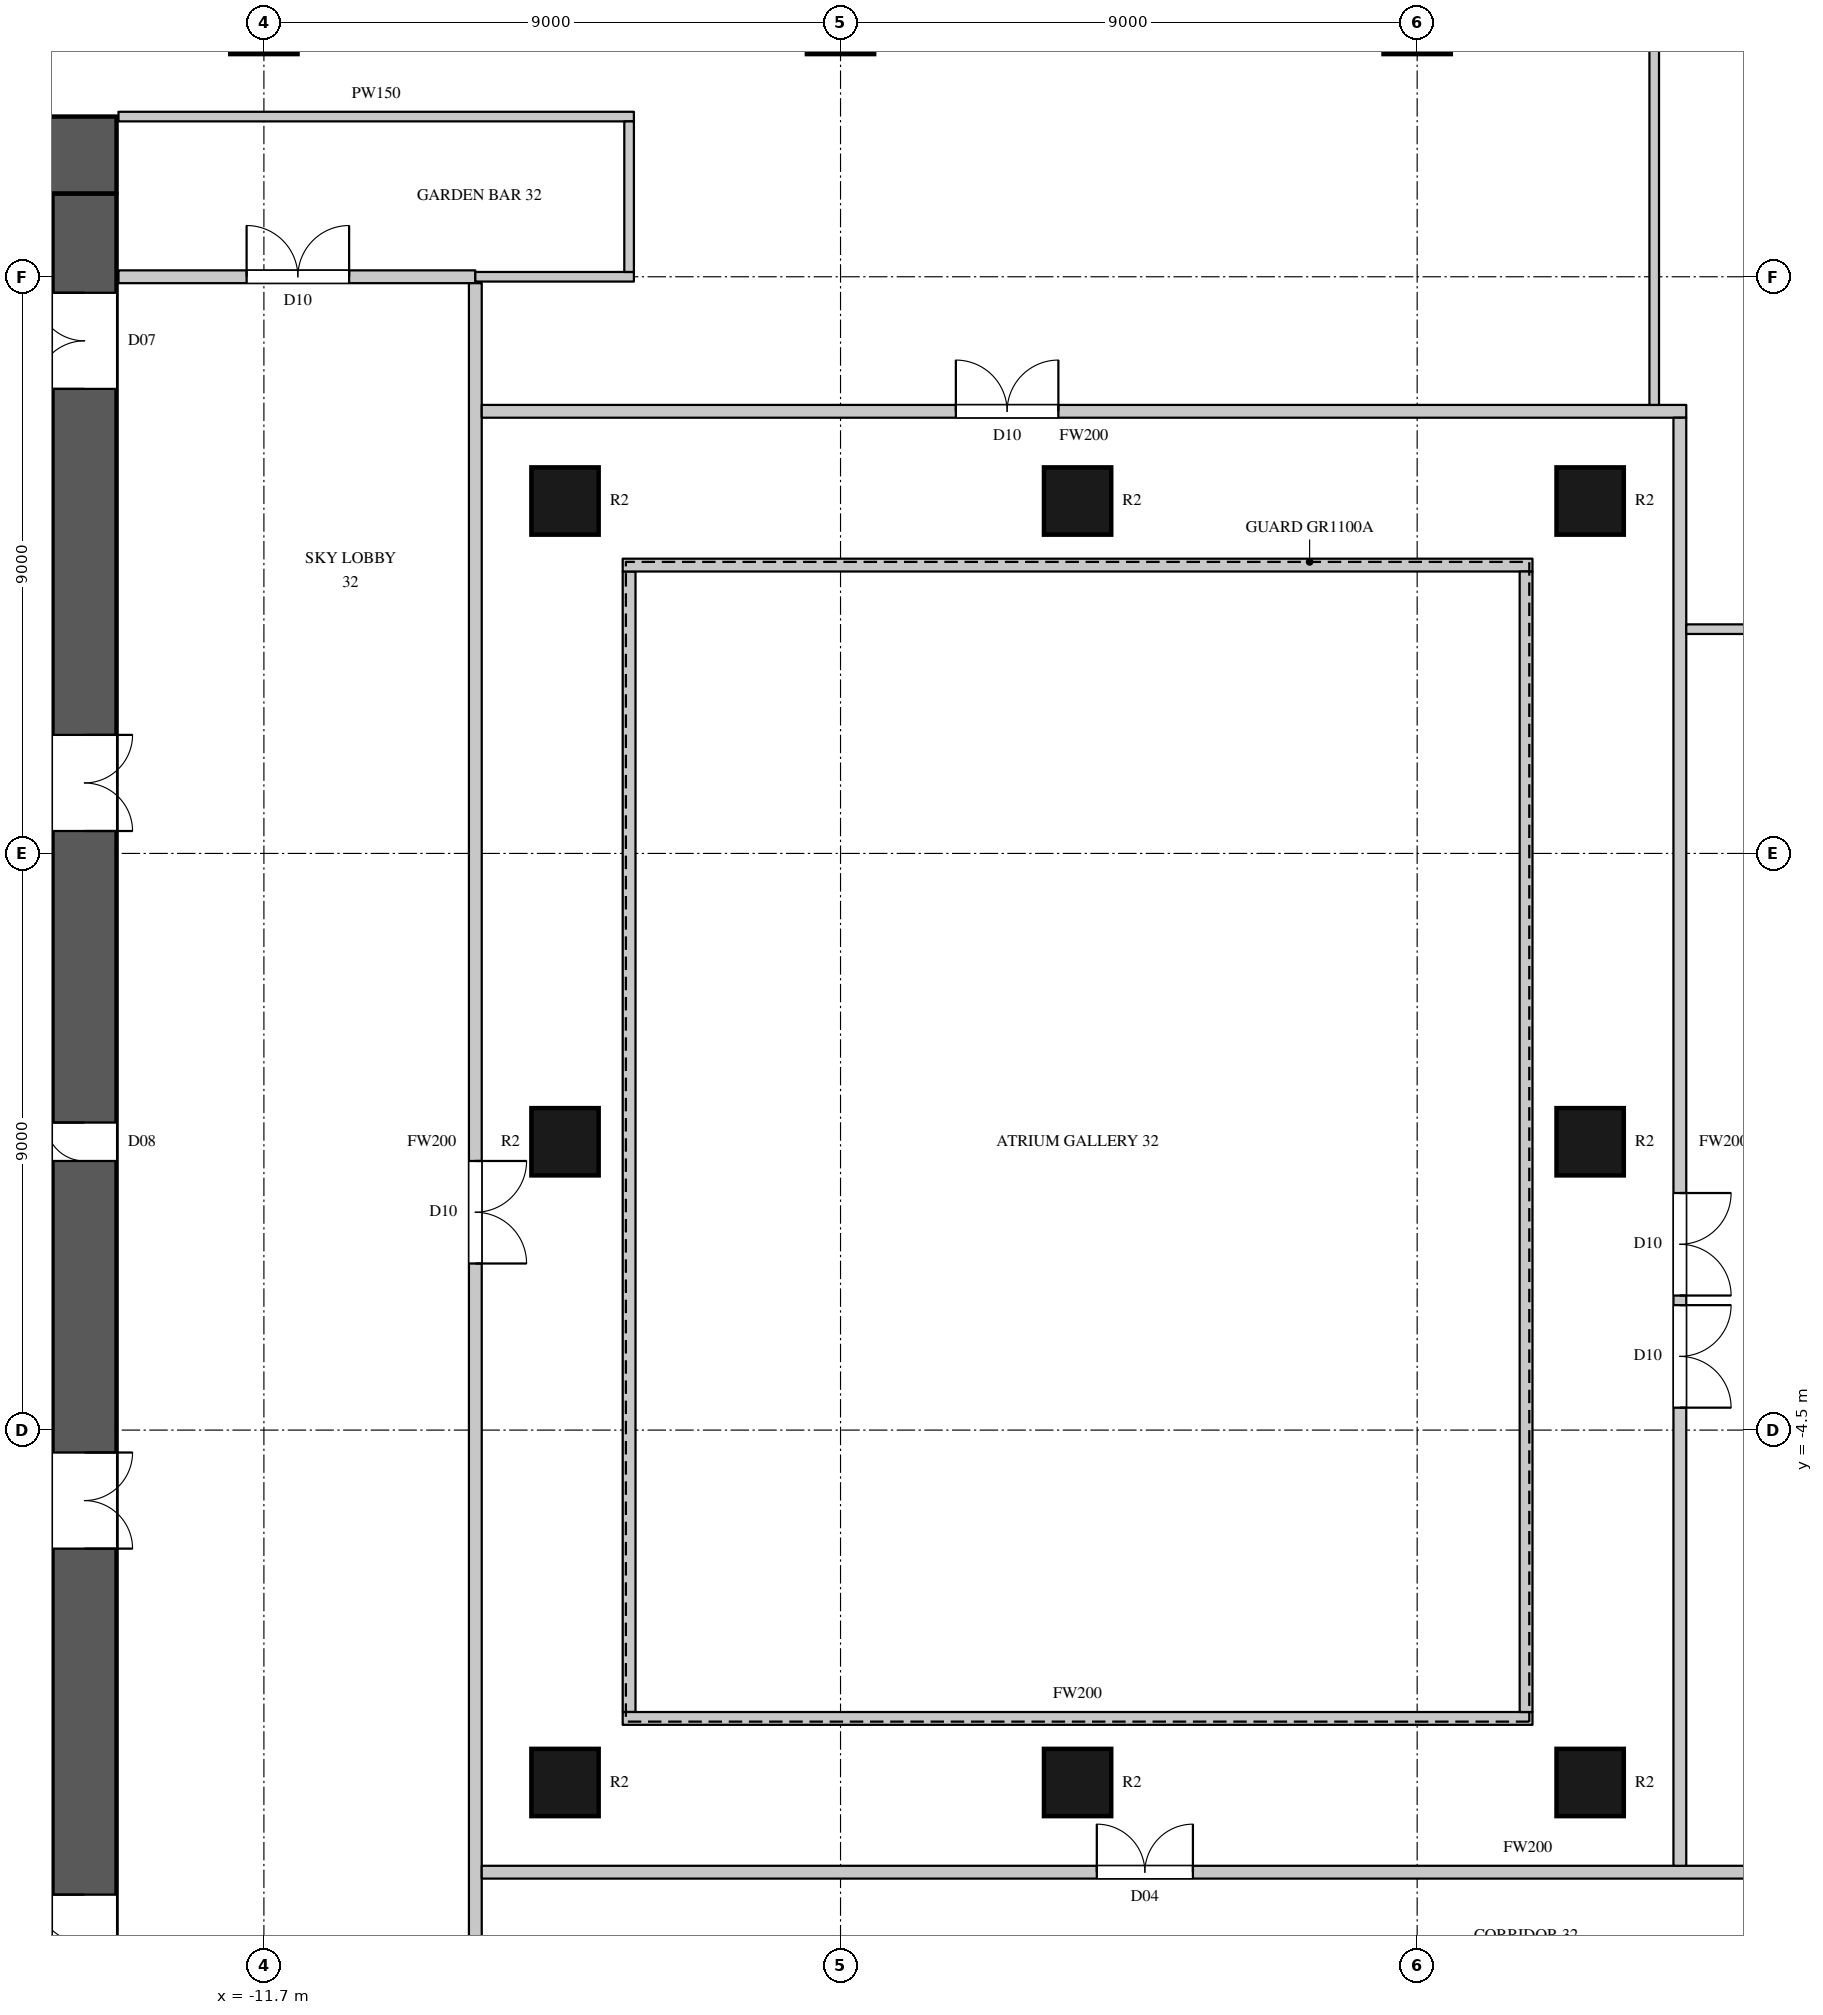
"""IFC4 building model, lengths in metres.
Left out: names, types, materials, properties, quantities, classifications, styles, units other than length and angle.
Written with IfcOpenShell. Run it as: python <this file> out.ifc"""

import sys

from ifc_helpers import new_model, si_unit, direction, frame, frame_2d, origin, origin_2d, place, context, subcontext, project, spatial, rectangle, circle, extrude, element, fill, save


model = new_model("IFC4")
c1 = context("Model", 3, precision=1e-05, world=origin(), true_north=direction((0.0, 1.0)))
c2 = subcontext(c1, "Body", "Model", "MODEL_VIEW")
j1 = project(units=[si_unit("LENGTHUNIT", "METRE"), si_unit("PLANEANGLEUNIT", "RADIAN")], contexts=[c1])
p1 = place(None, origin())
s1 = spatial("IfcSite", under=j1, at=p1, CompositionType="ELEMENT")
p2 = place(p1, origin())
s2 = spatial("IfcBuilding", under=s1, at=p2, CompositionType="ELEMENT")
p3 = place(p2, frame((0.0, 0.0, 145.5)))
s3 = spatial("IfcBuildingStorey", under=s2, at=p3, CompositionType="ELEMENT", Elevation=145.5)
for number, where, z_axis, x_axis in (
    (1, (-11.7, 17.5, 0.0), (0.0, 0.0, 1.0), (1.0, 0.0, 0.0)),
    (2, (-2.7, 17.5, 0.0), (0.0, 0.0, 1.0), (1.0, 0.0, 0.0)),
    (3, (6.3, 17.5, 0.0), (0.0, 0.0, 1.0), (1.0, 0.0, 0.0)),
    (4, (-7.0, -10.0, 0.0), (0.0, 0.0, 1.0), (1.0, 0.0, 0.0)),
    (5, (-7.0, 0.0, 0.0), (0.0, 0.0, 1.0), (1.0, 0.0, 0.0)),
    (6, (-7.0, 10.0, 0.0), (0.0, 0.0, 1.0), (1.0, 0.0, 0.0)),
    (7, (1.0, -10.0, 0.0), (0.0, 0.0, 1.0), (1.0, 0.0, 0.0)),
    (8, (1.0, 10.0, 0.0), (0.0, 0.0, 1.0), (1.0, 0.0, 0.0)),
    (9, (9.0, -10.0, 0.0), (0.0, 0.0, 1.0), (1.0, 0.0, 0.0)),
    (10, (9.0, 0.0, 0.0), (0.0, 0.0, 1.0), (1.0, 0.0, 0.0)),
    (11, (9.0, 10.0, 0.0), (0.0, 0.0, 1.0), (1.0, 0.0, 0.0)),
):
    element("IfcColumn", number, at=place(p3, frame(where, z_axis=z_axis, x_axis=x_axis)), inside=s3, PredefinedType="COLUMN", context=c2, shape_type="SweptSolid", body=[
        extrude(circle(Radius=0.525, at=origin_2d()), origin(), (0.0, 0.0, 1.0), 7.0),
    ])
p4 = place(p3, frame((-30.0, 15.4, 0.0), z_axis=(0.0, 0.0, 1.0), x_axis=(1.0, 0.0, 0.0)))
e12 = element("IfcWall", 12, at=p4, inside=s3, PredefinedType="SHEAR", context=c2, shape_type="SweptSolid", body=[
    extrude(rectangle(XDim=16.0, YDim=1.2, at=frame_2d((8.0, 0.0))), origin(), (0.0, 0.0, 1.0), 7.0),
])
p5 = place(p3, frame((-14.5, -14.8, 0.0), z_axis=(0.0, 0.0, 1.0), x_axis=(0.0, 1.0, 0.0)))
e13 = element("IfcWall", 13, at=p5, inside=s3, PredefinedType="SHEAR", context=c2, shape_type="SweptSolid", body=[
    extrude(rectangle(XDim=29.6, YDim=1.0, at=frame_2d((14.8, 0.0))), origin(), (0.0, 0.0, 1.0), 7.0),
])
p6 = place(p5, frame((1.55, 0.0, 0.0)))
e14 = element("IfcOpeningElement", 14, at=p6, cuts=e13, PredefinedType="OPENING", context=c2, shape_type="SweptSolid", body=[
    extrude(rectangle(XDim=1.5, YDim=2.4, at=frame_2d((0.75, 1.2))), frame((0.0, 0.51, 0.0), z_axis=(0.0, -1.0, 0.0), x_axis=(1.0, 0.0, 0.0)), (0.0, 0.0, 1.0), 1.02),
])
p7 = place(p5, frame((26.55, 0.0, 0.0)))
e15 = element("IfcOpeningElement", 15, at=p7, cuts=e13, PredefinedType="OPENING", context=c2, shape_type="SweptSolid", body=[
    extrude(rectangle(XDim=1.5, YDim=2.4, at=frame_2d((0.75, 1.2))), frame((0.0, 0.51, 0.0), z_axis=(0.0, -1.0, 0.0), x_axis=(1.0, 0.0, 0.0)), (0.0, 0.0, 1.0), 1.02),
])
p8 = place(p5, frame((8.45, 0.0, 0.0)))
e16 = element("IfcOpeningElement", 16, at=p8, cuts=e13, PredefinedType="OPENING", context=c2, shape_type="SweptSolid", body=[
    extrude(rectangle(XDim=1.5, YDim=2.4, at=frame_2d((0.75, 1.2))), frame((0.0, 0.51, 0.0), z_axis=(0.0, -1.0, 0.0), x_axis=(1.0, 0.0, 0.0)), (0.0, 0.0, 1.0), 1.02),
])
p9 = place(p5, frame((19.65, 0.0, 0.0)))
e17 = element("IfcOpeningElement", 17, at=p9, cuts=e13, PredefinedType="OPENING", context=c2, shape_type="SweptSolid", body=[
    extrude(rectangle(XDim=1.5, YDim=2.4, at=frame_2d((0.75, 1.2))), frame((0.0, 0.51, 0.0), z_axis=(0.0, -1.0, 0.0), x_axis=(1.0, 0.0, 0.0)), (0.0, 0.0, 1.0), 1.02),
])
p10 = place(p5, frame((14.5, 0.0, 0.0)))
e18 = element("IfcOpeningElement", 18, at=p10, cuts=e13, PredefinedType="OPENING", context=c2, shape_type="SweptSolid", body=[
    extrude(rectangle(XDim=0.6, YDim=2.0, at=frame_2d((0.3, 1.0))), frame((0.0, 0.51, 0.0), z_axis=(0.0, -1.0, 0.0), x_axis=(1.0, 0.0, 0.0)), (0.0, 0.0, 1.0), 1.02),
])
p11 = place(p3, frame((-13.97, 13.5, 0.0), z_axis=(0.0, 0.0, 1.0), x_axis=(1.0, 0.0, 0.0)))
e19 = element("IfcWall", 19, at=p11, inside=s3, PredefinedType="PARTITIONING", context=c2, shape_type="SweptSolid", body=[
    extrude(rectangle(XDim=5.57, YDim=0.2, at=frame_2d((2.785, 0.0))), origin(), (0.0, 0.0, 1.0), 6.7),
])
p12 = place(p11, frame((2.0, 0.0, 0.0)))
e20 = element("IfcOpeningElement", 20, at=p12, cuts=e19, PredefinedType="OPENING", context=c2, shape_type="SweptSolid", body=[
    extrude(rectangle(XDim=1.6, YDim=2.4, at=frame_2d((0.8, 1.2))), frame((0.0, 0.11, 0.0), z_axis=(0.0, -1.0, 0.0), x_axis=(1.0, 0.0, 0.0)), (0.0, 0.0, 1.0), 0.22),
])
p13 = place(p3, frame((-8.4, -13.4, 0.0), z_axis=(0.0, 0.0, 1.0), x_axis=(0.0, 1.0, 0.0)))
e21 = element("IfcWall", 21, at=p13, inside=s3, PredefinedType="PARTITIONING", context=c2, shape_type="SweptSolid", body=[
    extrude(rectangle(XDim=26.8, YDim=0.2, at=frame_2d((13.4, 0.0))), origin(), (0.0, 0.0, 1.0), 6.7),
])
p14 = place(p13, frame((11.5, 0.0, 0.0)))
e22 = element("IfcOpeningElement", 22, at=p14, cuts=e21, PredefinedType="OPENING", context=c2, shape_type="SweptSolid", body=[
    extrude(rectangle(XDim=1.6, YDim=2.4, at=frame_2d((0.8, 1.2))), frame((0.0, 0.11, 0.0), z_axis=(0.0, -1.0, 0.0), x_axis=(1.0, 0.0, 0.0)), (0.0, 0.0, 1.0), 0.22),
])
p15 = place(p3, frame((-8.3, -11.4, 0.0), z_axis=(0.0, 0.0, 1.0), x_axis=(1.0, 0.0, 0.0)))
e23 = element("IfcWall", 23, at=p15, inside=s3, PredefinedType="PARTITIONING", context=c2, shape_type="SweptSolid", body=[
    extrude(rectangle(XDim=32.655, YDim=0.2, at=frame_2d((16.328, 0.0))), origin(), (0.0, 0.0, 1.0), 6.7),
])
p16 = place(p15, frame((9.6, 0.0, 0.0)))
e24 = element("IfcOpeningElement", 24, at=p16, cuts=e23, PredefinedType="OPENING", context=c2, shape_type="SweptSolid", body=[
    extrude(rectangle(XDim=1.5, YDim=2.2, at=frame_2d((0.75, 1.1))), frame((0.0, 0.11, 0.0), z_axis=(0.0, -1.0, 0.0), x_axis=(1.0, 0.0, 0.0)), (0.0, 0.0, 1.0), 0.22),
])
p17 = place(p15, frame((28.45, 0.0, 0.0)))
e25 = element("IfcOpeningElement", 25, at=p17, cuts=e23, PredefinedType="OPENING", context=c2, shape_type="SweptSolid", body=[
    extrude(rectangle(XDim=0.95, YDim=2.2, at=frame_2d((0.475, 1.1))), frame((0.0, 0.11, 0.0), z_axis=(0.0, -1.0, 0.0), x_axis=(1.0, 0.0, 0.0)), (0.0, 0.0, 1.0), 0.22),
])
p18 = place(p3, frame((-8.3, 11.4, 0.0), z_axis=(0.0, 0.0, 1.0), x_axis=(1.0, 0.0, 0.0)))
e26 = element("IfcWall", 26, at=p18, inside=s3, PredefinedType="PARTITIONING", context=c2, shape_type="SweptSolid", body=[
    extrude(rectangle(XDim=18.8, YDim=0.2, at=frame_2d((9.4, 0.0))), origin(), (0.0, 0.0, 1.0), 6.7),
])
p19 = place(p18, frame((7.4, 0.0, 0.0)))
e27 = element("IfcOpeningElement", 27, at=p19, cuts=e26, PredefinedType="OPENING", context=c2, shape_type="SweptSolid", body=[
    extrude(rectangle(XDim=1.6, YDim=2.4, at=frame_2d((0.8, 1.2))), frame((0.0, 0.11, 0.0), z_axis=(0.0, -1.0, 0.0), x_axis=(1.0, 0.0, 0.0)), (0.0, 0.0, 1.0), 0.22),
])
p20 = place(p3, frame((-6.0, -8.9, 0.0), z_axis=(0.0, 0.0, 1.0), x_axis=(0.0, 1.0, 0.0)))
e28 = element("IfcWall", 28, at=p20, inside=s3, PredefinedType="PARTITIONING", context=c2, shape_type="SweptSolid", body=[
    extrude(rectangle(XDim=17.8, YDim=0.2, at=frame_2d((8.9, 0.0))), origin(), (0.0, 0.0, 1.0), 6.7),
])
for number, where, z_axis, x_axis in (
    (29, (-6.1, -9.0, 0.0), (0.0, 0.0, 1.0), (1.0, 0.0, 0.0)),
    (30, (-6.1, 9.0, 0.0), (0.0, 0.0, 1.0), (1.0, 0.0, 0.0)),
):
    element("IfcWall", number, at=place(p3, frame(where, z_axis=z_axis, x_axis=x_axis)), inside=s3, PredefinedType="PARTITIONING", context=c2, shape_type="SweptSolid", body=[
        extrude(rectangle(XDim=14.2, YDim=0.2, at=frame_2d((7.1, 0.0))), origin(), (0.0, 0.0, 1.0), 6.7),
    ])
p21 = place(p3, frame((8.0, -8.9, 0.0), z_axis=(0.0, 0.0, 1.0), x_axis=(0.0, 1.0, 0.0)))
e31 = element("IfcWall", 31, at=p21, inside=s3, PredefinedType="PARTITIONING", context=c2, shape_type="SweptSolid", body=[
    extrude(rectangle(XDim=17.8, YDim=0.2, at=frame_2d((8.9, 0.0))), origin(), (0.0, 0.0, 1.0), 6.7),
])
p22 = place(p3, frame((10.4, -11.3, 0.0), z_axis=(0.0, 0.0, 1.0), x_axis=(0.0, 1.0, 0.0)))
e32 = element("IfcWall", 32, at=p22, inside=s3, PredefinedType="PARTITIONING", context=c2, shape_type="SweptSolid", body=[
    extrude(rectangle(XDim=22.6, YDim=0.2, at=frame_2d((11.3, 0.0))), origin(), (0.0, 0.0, 1.0), 6.7),
])
p23 = place(p22, frame((8.9, 0.0, 0.0)))
e33 = element("IfcOpeningElement", 33, at=p23, cuts=e32, PredefinedType="OPENING", context=c2, shape_type="SweptSolid", body=[
    extrude(rectangle(XDim=1.6, YDim=2.4, at=frame_2d((0.8, 1.2))), frame((0.0, 0.11, 0.0), z_axis=(0.0, -1.0, 0.0), x_axis=(1.0, 0.0, 0.0)), (0.0, 0.0, 1.0), 0.22),
])
p24 = place(p22, frame((7.15, 0.0, 0.0)))
e34 = element("IfcOpeningElement", 34, at=p24, cuts=e32, PredefinedType="OPENING", context=c2, shape_type="SweptSolid", body=[
    extrude(rectangle(XDim=1.6, YDim=2.4, at=frame_2d((0.8, 1.2))), frame((0.0, 0.11, 0.0), z_axis=(0.0, -1.0, 0.0), x_axis=(1.0, 0.0, 0.0)), (0.0, 0.0, 1.0), 0.22),
])
p25 = place(p3, frame((-13.97, 16.0, 0.0), z_axis=(0.0, 0.0, 1.0), x_axis=(1.0, 0.0, 0.0)))
e35 = element("IfcWall", 35, at=p25, inside=s3, PredefinedType="PARTITIONING", context=c2, shape_type="SweptSolid", body=[
    extrude(rectangle(XDim=8.045, YDim=0.15, at=frame_2d((4.022, 0.0))), origin(), (0.0, 0.0, 1.0), 6.7),
])
p26 = place(p3, frame((-8.4, 13.5, 0.0), z_axis=(0.0, 0.0, 1.0), x_axis=(1.0, 0.0, 0.0)))
e36 = element("IfcWall", 36, at=p26, inside=s3, PredefinedType="PARTITIONING", context=c2, shape_type="SweptSolid", body=[
    extrude(rectangle(XDim=2.475, YDim=0.15, at=frame_2d((1.237, 0.0))), origin(), (0.0, 0.0, 1.0), 6.7),
])
p27 = place(p3, frame((-6.0, 13.575, 0.0), z_axis=(0.0, 0.0, 1.0), x_axis=(0.0, 1.0, 0.0)))
e37 = element("IfcWall", 37, at=p27, inside=s3, PredefinedType="PARTITIONING", context=c2, shape_type="SweptSolid", body=[
    extrude(rectangle(XDim=2.35, YDim=0.15, at=frame_2d((1.175, 0.0))), origin(), (0.0, 0.0, 1.0), 6.7),
])
p28 = place(p3, frame((10.0, 11.5, 0.0), z_axis=(0.0, 0.0, 1.0), x_axis=(0.0, 1.0, 0.0)))
e38 = element("IfcWall", 38, at=p28, inside=s3, PredefinedType="PARTITIONING", context=c2, shape_type="SweptSolid", body=[
    extrude(rectangle(XDim=14.255, YDim=0.15, at=frame_2d((7.127, 0.0))), origin(), (0.0, 0.0, 1.0), 6.7),
])
p29 = place(p28, frame((9.8, 0.0, 0.0)))
e39 = element("IfcOpeningElement", 39, at=p29, cuts=e38, PredefinedType="OPENING", context=c2, shape_type="SweptSolid", body=[
    extrude(rectangle(XDim=0.95, YDim=2.2, at=frame_2d((0.475, 1.1))), frame((0.0, 0.085, 0.0), z_axis=(0.0, -1.0, 0.0), x_axis=(1.0, 0.0, 0.0)), (0.0, 0.0, 1.0), 0.17),
])
p30 = place(p3, frame((10.5, 8.0, 0.0), z_axis=(0.0, 0.0, 1.0), x_axis=(1.0, 0.0, 0.0)))
e40 = element("IfcWall", 40, at=p30, inside=s3, PredefinedType="PARTITIONING", context=c2, shape_type="SweptSolid", body=[
    extrude(rectangle(XDim=13.855, YDim=0.15, at=frame_2d((6.927, 0.0))), origin(), (0.0, 0.0, 1.0), 6.7),
])
p31 = place(p30, frame((2.85, 0.0, 0.0)))
e41 = element("IfcOpeningElement", 41, at=p31, cuts=e40, PredefinedType="OPENING", context=c2, shape_type="SweptSolid", body=[
    extrude(rectangle(XDim=0.95, YDim=2.2, at=frame_2d((0.475, 1.1))), frame((0.0, 0.085, 0.0), z_axis=(0.0, -1.0, 0.0), x_axis=(1.0, 0.0, 0.0)), (0.0, 0.0, 1.0), 0.17),
])
p32 = place(p14, origin())
e42 = element("IfcDoor", 42, at=p32, inside=s3, OperationType="DOUBLE_DOOR_SINGLE_SWING", PredefinedType="DOOR", context=c2, shape_type="SweptSolid", body=[
    extrude(rectangle(XDim=1.6, YDim=2.4, at=frame_2d((0.8, 1.2))), frame((0.0, 0.025, 0.0), z_axis=(0.0, -1.0, 0.0), x_axis=(1.0, 0.0, 0.0)), (0.0, 0.0, 1.0), 0.05),
])
fill(e22, e42)
p33 = place(p19, origin())
e43 = element("IfcDoor", 43, at=p33, inside=s3, OperationType="DOUBLE_DOOR_SINGLE_SWING", PredefinedType="DOOR", context=c2, shape_type="SweptSolid", body=[
    extrude(rectangle(XDim=1.6, YDim=2.4, at=frame_2d((0.8, 1.2))), frame((0.0, 0.025, 0.0), z_axis=(0.0, -1.0, 0.0), x_axis=(1.0, 0.0, 0.0)), (0.0, 0.0, 1.0), 0.05),
])
fill(e27, e43)
p34 = place(p12, origin())
e44 = element("IfcDoor", 44, at=p34, inside=s3, OperationType="DOUBLE_DOOR_SINGLE_SWING", PredefinedType="DOOR", context=c2, shape_type="SweptSolid", body=[
    extrude(rectangle(XDim=1.6, YDim=2.4, at=frame_2d((0.8, 1.2))), frame((0.0, 0.025, 0.0), z_axis=(0.0, -1.0, 0.0), x_axis=(1.0, 0.0, 0.0)), (0.0, 0.0, 1.0), 0.05),
])
fill(e20, e44)
p35 = place(p23, origin())
e45 = element("IfcDoor", 45, at=p35, inside=s3, OperationType="DOUBLE_DOOR_SINGLE_SWING", PredefinedType="DOOR", context=c2, shape_type="SweptSolid", body=[
    extrude(rectangle(XDim=1.6, YDim=2.4, at=frame_2d((0.8, 1.2))), frame((0.0, 0.025, 0.0), z_axis=(0.0, -1.0, 0.0), x_axis=(1.0, 0.0, 0.0)), (0.0, 0.0, 1.0), 0.05),
])
fill(e33, e45)
p36 = place(p24, origin())
e46 = element("IfcDoor", 46, at=p36, inside=s3, OperationType="DOUBLE_DOOR_SINGLE_SWING", PredefinedType="DOOR", context=c2, shape_type="SweptSolid", body=[
    extrude(rectangle(XDim=1.6, YDim=2.4, at=frame_2d((0.8, 1.2))), frame((0.0, 0.025, 0.0), z_axis=(0.0, -1.0, 0.0), x_axis=(1.0, 0.0, 0.0)), (0.0, 0.0, 1.0), 0.05),
])
fill(e34, e46)
p37 = place(p16, origin())
e47 = element("IfcDoor", 47, at=p37, inside=s3, OperationType="DOUBLE_DOOR_SINGLE_SWING", PredefinedType="DOOR", context=c2, shape_type="SweptSolid", body=[
    extrude(rectangle(XDim=1.5, YDim=2.2, at=frame_2d((0.75, 1.1))), frame((0.0, 0.025, 0.0), z_axis=(0.0, -1.0, 0.0), x_axis=(1.0, 0.0, 0.0)), (0.0, 0.0, 1.0), 0.05),
])
fill(e24, e47)
p38 = place(p6, origin())
e48 = element("IfcDoor", 48, at=p38, inside=s3, OperationType="DOUBLE_DOOR_SINGLE_SWING", PredefinedType="DOOR", context=c2, shape_type="SweptSolid", body=[
    extrude(rectangle(XDim=1.5, YDim=2.4, at=frame_2d((0.75, 1.2))), frame((0.0, 0.495, 0.0), z_axis=(0.0, -1.0, 0.0), x_axis=(1.0, 0.0, 0.0)), (0.0, 0.0, 1.0), 0.05),
])
fill(e14, e48)
p39 = place(p7, origin())
e49 = element("IfcDoor", 49, at=p39, inside=s3, OperationType="DOUBLE_DOOR_SINGLE_SWING", PredefinedType="DOOR", context=c2, shape_type="SweptSolid", body=[
    extrude(rectangle(XDim=1.5, YDim=2.4, at=frame_2d((0.75, 1.2))), frame((0.0, 0.495, 0.0), z_axis=(0.0, -1.0, 0.0), x_axis=(1.0, 0.0, 0.0)), (0.0, 0.0, 1.0), 0.05),
])
fill(e15, e49)
p40 = place(p8, origin())
e50 = element("IfcDoor", 50, at=p40, inside=s3, OperationType="DOUBLE_DOOR_SINGLE_SWING", PredefinedType="DOOR", context=c2, shape_type="SweptSolid", body=[
    extrude(rectangle(XDim=1.5, YDim=2.4, at=frame_2d((0.75, 1.2))), frame((0.0, -0.445, 0.0), z_axis=(0.0, -1.0, 0.0), x_axis=(1.0, 0.0, 0.0)), (0.0, 0.0, 1.0), 0.05),
])
fill(e16, e50)
p41 = place(p9, origin())
e51 = element("IfcDoor", 51, at=p41, inside=s3, OperationType="DOUBLE_DOOR_SINGLE_SWING", PredefinedType="DOOR", context=c2, shape_type="SweptSolid", body=[
    extrude(rectangle(XDim=1.5, YDim=2.4, at=frame_2d((0.75, 1.2))), frame((0.0, -0.445, 0.0), z_axis=(0.0, -1.0, 0.0), x_axis=(1.0, 0.0, 0.0)), (0.0, 0.0, 1.0), 0.05),
])
fill(e17, e51)
p42 = place(p10, origin())
e52 = element("IfcDoor", 52, at=p42, inside=s3, OperationType="SINGLE_SWING_RIGHT", PredefinedType="DOOR", context=c2, shape_type="SweptSolid", body=[
    extrude(rectangle(XDim=0.6, YDim=2.0, at=frame_2d((0.3, 1.0))), frame((0.0, 0.495, 0.0), z_axis=(0.0, -1.0, 0.0), x_axis=(1.0, 0.0, 0.0)), (0.0, 0.0, 1.0), 0.05),
])
fill(e18, e52)
save(model, sys.argv[1])
